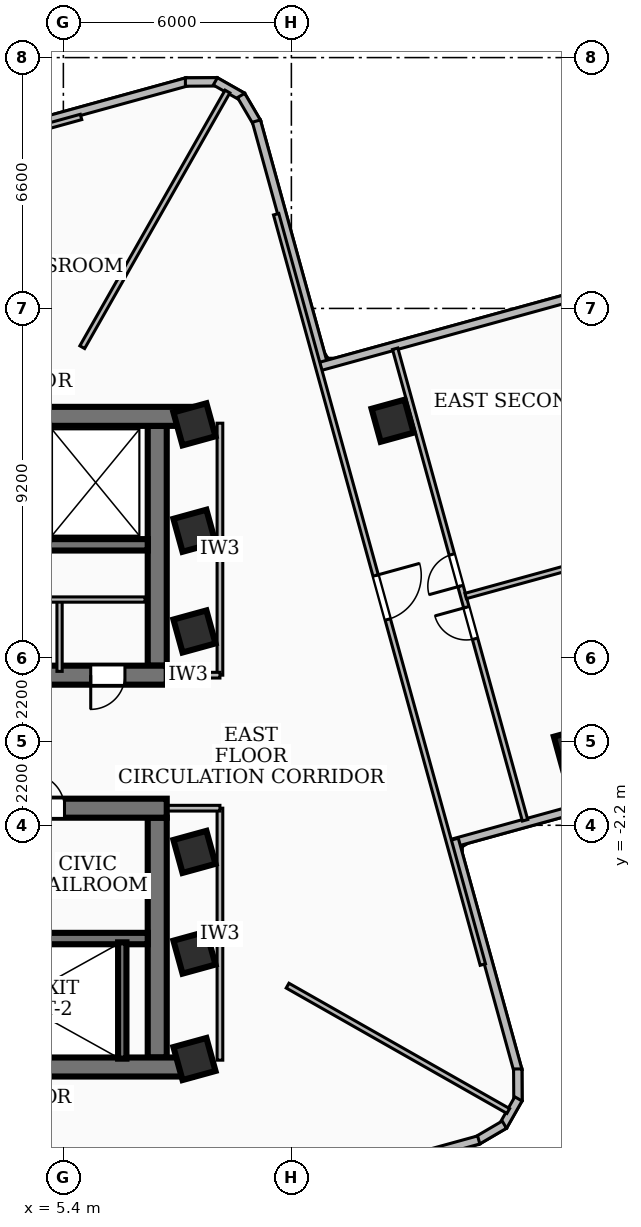
"""IFC4 building model, lengths in metres.
Left out: names, types, materials, properties, quantities, classifications, styles, units other than length and angle.
Written with IfcOpenShell. Run it as: python <this file> out.ifc"""

import sys

from ifc_helpers import new_model, si_unit, direction, frame, frame_2d, origin, origin_2d, place, context, subcontext, project, spatial, rectangle, extrude, element, fill, save


model = new_model("IFC4")
c1 = context("Model", 3, precision=1e-05, world=origin(), true_north=direction((0.0, 1.0)))
c2 = subcontext(c1, "Body", "Model", "MODEL_VIEW")
j1 = project(units=[si_unit("LENGTHUNIT", "METRE"), si_unit("PLANEANGLEUNIT", "RADIAN")], contexts=[c1])
p1 = place(None, origin())
s1 = spatial("IfcSite", under=j1, at=p1, CompositionType="ELEMENT")
p2 = place(p1, origin())
s2 = spatial("IfcBuilding", under=s1, at=p2, CompositionType="ELEMENT")
p3 = place(p2, frame((0.0, 0.0, 134.28)))
s3 = spatial("IfcBuildingStorey", under=s2, at=p3, CompositionType="ELEMENT", Elevation=134.28)
p4 = place(p3, frame((-8.78, 8.56, 0.0), z_axis=(0.0, 0.0, 1.0), x_axis=(1.0, 0.0, 0.0)))
e1 = element("IfcWall", 1, at=p4, inside=s3, PredefinedType="SHEAR", context=c2, shape_type="SweptSolid", body=[
    extrude(rectangle(XDim=17.56, YDim=0.5, at=frame_2d((8.78, 0.0))), origin(), (0.0, 0.0, 1.0), 3.32),
])
p5 = place(p3, frame((8.12, 1.75, 0.0), z_axis=(0.0, 0.0, 1.0), x_axis=(-1.0, 0.0, 0.0)))
e2 = element("IfcWall", 2, at=p5, inside=s3, PredefinedType="SHEAR", context=c2, shape_type="SweptSolid", body=[
    extrude(rectangle(XDim=16.24, YDim=0.5, at=frame_2d((8.12, 0.0))), origin(), (0.0, 0.0, 1.0), 3.32),
])
p6 = place(p5, frame((7.45, 0.0, 0.0)))
e3 = element("IfcOpeningElement", 3, at=p6, cuts=e2, PredefinedType="OPENING", context=c2, shape_type="SweptSolid", body=[
    extrude(rectangle(XDim=1.0, YDim=2.1, at=frame_2d((0.5, 1.05))), frame((0.0, 0.26, 0.0), z_axis=(0.0, -1.0, 0.0), x_axis=(1.0, 0.0, 0.0)), (0.0, 0.0, 1.0), 0.52),
])
p7 = place(p5, frame((3.4, 0.0, 0.0)))
e4 = element("IfcOpeningElement", 4, at=p7, cuts=e2, PredefinedType="OPENING", context=c2, shape_type="SweptSolid", body=[
    extrude(rectangle(XDim=0.9, YDim=2.06, at=frame_2d((0.45, 1.03))), frame((0.0, 0.26, 0.0), z_axis=(0.0, -1.0, 0.0), x_axis=(1.0, 0.0, 0.0)), (0.0, 0.0, 1.0), 0.52),
])
p8 = place(p5, frame((1.1, 0.0, 0.0)))
e5 = element("IfcOpeningElement", 5, at=p8, cuts=e2, PredefinedType="OPENING", context=c2, shape_type="SweptSolid", body=[
    extrude(rectangle(XDim=0.9, YDim=2.06, at=frame_2d((0.45, 1.03))), frame((0.0, 0.26, 0.0), z_axis=(0.0, -1.0, 0.0), x_axis=(1.0, 0.0, 0.0)), (0.0, 0.0, 1.0), 0.52),
])
p9 = place(p3, frame((7.87, 8.31, 0.0), z_axis=(0.0, 0.0, 1.0), x_axis=(0.0, -1.0, 0.0)))
e6 = element("IfcWall", 6, at=p9, inside=s3, PredefinedType="SHEAR", context=c2, shape_type="SweptSolid", body=[
    extrude(rectangle(XDim=6.31, YDim=0.5, at=frame_2d((3.155, 0.0))), origin(), (0.0, 0.0, 1.0), 3.32),
])
p10 = place(p3, frame((7.62, 5.18, 0.0), z_axis=(0.0, 0.0, 1.0), x_axis=(-1.0, 0.0, 0.0)))
e7 = element("IfcWall", 7, at=p10, inside=s3, PredefinedType="SOLIDWALL", context=c2, shape_type="SweptSolid", body=[
    extrude(rectangle(XDim=15.24, YDim=0.3, at=frame_2d((7.62, 0.0))), origin(), (0.0, 0.0, 1.0), 3.32),
])
p11 = place(p10, frame((5.77, 0.0, 0.0)))
e8 = element("IfcOpeningElement", 8, at=p11, cuts=e7, PredefinedType="OPENING", context=c2, shape_type="SweptSolid", body=[
    extrude(rectangle(XDim=1.1, YDim=2.15, at=frame_2d((0.55, 1.075))), frame((0.0, 0.16, 0.0), z_axis=(0.0, -1.0, 0.0), x_axis=(1.0, 0.0, 0.0)), (0.0, 0.0, 1.0), 0.32),
])
p12 = place(p10, frame((2.97, 0.0, 0.0)))
e9 = element("IfcOpeningElement", 9, at=p12, cuts=e7, PredefinedType="OPENING", context=c2, shape_type="SweptSolid", body=[
    extrude(rectangle(XDim=1.1, YDim=2.15, at=frame_2d((0.55, 1.075))), frame((0.0, 0.16, 0.0), z_axis=(0.0, -1.0, 0.0), x_axis=(1.0, 0.0, 0.0)), (0.0, 0.0, 1.0), 0.32),
])
p13 = place(p10, frame((7.97, 0.0, 0.0)))
e10 = element("IfcOpeningElement", 10, at=p13, cuts=e7, PredefinedType="OPENING", context=c2, shape_type="SweptSolid", body=[
    extrude(rectangle(XDim=1.0, YDim=2.1, at=frame_2d((0.5, 1.05))), frame((0.0, 0.16, 0.0), z_axis=(0.0, -1.0, 0.0), x_axis=(1.0, 0.0, 0.0)), (0.0, 0.0, 1.0), 0.32),
])
p14 = place(p3, frame((8.78, -8.56, 0.0), z_axis=(0.0, 0.0, 1.0), x_axis=(-1.0, 0.0, 0.0)))
e11 = element("IfcWall", 11, at=p14, inside=s3, PredefinedType="SHEAR", context=c2, shape_type="SweptSolid", body=[
    extrude(rectangle(XDim=17.56, YDim=0.5, at=frame_2d((8.78, 0.0))), origin(), (0.0, 0.0, 1.0), 3.32),
])
p15 = place(p3, frame((-8.12, -1.75, 0.0), z_axis=(0.0, 0.0, 1.0), x_axis=(1.0, 0.0, 0.0)))
e12 = element("IfcWall", 12, at=p15, inside=s3, PredefinedType="SHEAR", context=c2, shape_type="SweptSolid", body=[
    extrude(rectangle(XDim=16.24, YDim=0.5, at=frame_2d((8.12, 0.0))), origin(), (0.0, 0.0, 1.0), 3.32),
])
p16 = place(p15, frame((7.45, 0.0, 0.0)))
e13 = element("IfcOpeningElement", 13, at=p16, cuts=e12, PredefinedType="OPENING", context=c2, shape_type="SweptSolid", body=[
    extrude(rectangle(XDim=1.0, YDim=2.1, at=frame_2d((0.5, 1.05))), frame((0.0, 0.26, 0.0), z_axis=(0.0, -1.0, 0.0), x_axis=(1.0, 0.0, 0.0)), (0.0, 0.0, 1.0), 0.52),
])
p17 = place(p15, frame((12.65, 0.0, 0.0)))
e14 = element("IfcOpeningElement", 14, at=p17, cuts=e12, PredefinedType="OPENING", context=c2, shape_type="SweptSolid", body=[
    extrude(rectangle(XDim=0.9, YDim=2.06, at=frame_2d((0.45, 1.03))), frame((0.0, 0.26, 0.0), z_axis=(0.0, -1.0, 0.0), x_axis=(1.0, 0.0, 0.0)), (0.0, 0.0, 1.0), 0.52),
])
p18 = place(p15, frame((0.565, 0.0, 0.0)))
e15 = element("IfcOpeningElement", 15, at=p18, cuts=e12, PredefinedType="OPENING", context=c2, shape_type="SweptSolid", body=[
    extrude(rectangle(XDim=1.05, YDim=2.15, at=frame_2d((0.525, 1.075))), frame((0.0, 0.26, 0.0), z_axis=(0.0, -1.0, 0.0), x_axis=(1.0, 0.0, 0.0)), (0.0, 0.0, 1.0), 0.52),
])
p19 = place(p15, frame((2.125, 0.0, 0.0)))
e16 = element("IfcOpeningElement", 16, at=p19, cuts=e12, PredefinedType="OPENING", context=c2, shape_type="SweptSolid", body=[
    extrude(rectangle(XDim=1.05, YDim=2.15, at=frame_2d((0.525, 1.075))), frame((0.0, 0.26, 0.0), z_axis=(0.0, -1.0, 0.0), x_axis=(1.0, 0.0, 0.0)), (0.0, 0.0, 1.0), 0.52),
])
p20 = place(p15, frame((3.685, 0.0, 0.0)))
e17 = element("IfcOpeningElement", 17, at=p20, cuts=e12, PredefinedType="OPENING", context=c2, shape_type="SweptSolid", body=[
    extrude(rectangle(XDim=1.05, YDim=2.15, at=frame_2d((0.525, 1.075))), frame((0.0, 0.26, 0.0), z_axis=(0.0, -1.0, 0.0), x_axis=(1.0, 0.0, 0.0)), (0.0, 0.0, 1.0), 0.52),
])
p21 = place(p3, frame((7.87, -2.0, 0.0), z_axis=(0.0, 0.0, 1.0), x_axis=(0.0, -1.0, 0.0)))
e18 = element("IfcWall", 18, at=p21, inside=s3, PredefinedType="SHEAR", context=c2, shape_type="SweptSolid", body=[
    extrude(rectangle(XDim=6.31, YDim=0.5, at=frame_2d((3.155, 0.0))), origin(), (0.0, 0.0, 1.0), 3.32),
])
p22 = place(p3, frame((-7.62, -5.18, 0.0), z_axis=(0.0, 0.0, 1.0), x_axis=(1.0, 0.0, 0.0)))
e19 = element("IfcWall", 19, at=p22, inside=s3, PredefinedType="SOLIDWALL", context=c2, shape_type="SweptSolid", body=[
    extrude(rectangle(XDim=15.24, YDim=0.3, at=frame_2d((7.62, 0.0))), origin(), (0.0, 0.0, 1.0), 3.32),
])
p23 = place(p22, frame((5.77, 0.0, 0.0)))
e20 = element("IfcOpeningElement", 20, at=p23, cuts=e19, PredefinedType="OPENING", context=c2, shape_type="SweptSolid", body=[
    extrude(rectangle(XDim=1.1, YDim=2.15, at=frame_2d((0.55, 1.075))), frame((0.0, 0.16, 0.0), z_axis=(0.0, -1.0, 0.0), x_axis=(1.0, 0.0, 0.0)), (0.0, 0.0, 1.0), 0.32),
])
p24 = place(p22, frame((7.97, 0.0, 0.0)))
e21 = element("IfcOpeningElement", 21, at=p24, cuts=e19, PredefinedType="OPENING", context=c2, shape_type="SweptSolid", body=[
    extrude(rectangle(XDim=1.0, YDim=2.1, at=frame_2d((0.5, 1.05))), frame((0.0, 0.16, 0.0), z_axis=(0.0, -1.0, 0.0), x_axis=(1.0, 0.0, 0.0)), (0.0, 0.0, 1.0), 0.32),
])
p25 = place(p3, frame((6.95, -8.34, 0.0), z_axis=(0.0, 0.0, 1.0), x_axis=(0.0, 1.0, 0.0)))
e22 = element("IfcWall", 22, at=p25, inside=s3, PredefinedType="SOLIDWALL", context=c2, shape_type="SweptSolid", body=[
    extrude(rectangle(XDim=3.06, YDim=0.22, at=frame_2d((1.53, 0.0))), origin(), (0.0, 0.0, 1.0), 3.32),
])
for number, where, z_axis, x_axis in (
    (23, (8.85, -5.55, 0.0), (0.0, 0.0, 1.0), (0.964, 0.266, 0.0)),
    (24, (8.85, -2.9, 0.0), (0.0, 0.0, 1.0), (0.964, 0.266, 0.0)),
    (25, (8.85, 2.9, 0.0), (0.0, 0.0, 1.0), (0.964, 0.266, 0.0)),
    (26, (8.85, 5.55, 0.0), (0.0, 0.0, 1.0), (0.964, 0.266, 0.0)),
    (27, (8.85, -8.35, 0.0), (0.0, 0.0, 1.0), (0.964, 0.266, 0.0)),
    (28, (8.85, 8.35, 0.0), (0.0, 0.0, 1.0), (0.964, 0.266, 0.0)),
    (29, (18.86, -0.183, 0.0), (0.0, 0.0, 1.0), (0.964, 0.266, 0.0)),
    (30, (14.064, 8.445, 0.0), (0.0, 0.0, 1.0), (0.964, 0.266, 0.0)),
):
    element("IfcColumn", number, at=place(p3, frame(where, z_axis=z_axis, x_axis=x_axis)), inside=s3, PredefinedType="COLUMN", context=c2, shape_type="SweptSolid", body=[
        extrude(rectangle(XDim=0.9, YDim=0.9, at=origin_2d()), origin(), (0.0, 0.0, 1.0), 3.6),
    ])
p26 = place(p3, frame((2.568, 15.686, 0.0), z_axis=(0.0, 0.0, 1.0), x_axis=(0.964094670911, 0.265558779784, 0.0)))
e31 = element("IfcWall", 31, at=p26, inside=s3, PredefinedType="SOLIDWALL", context=c2, shape_type="SweptSolid", body=[
    extrude(rectangle(XDim=6.319, YDim=0.22, at=frame_2d((3.159, 0.0))), origin(), (0.0, 0.0, 1.0), 2.55),
])
p27 = place(p3, frame((8.611, 17.357, 0.0), z_axis=(0.0, 0.0, 1.0), x_axis=(0.999981148579, 0.006140235123, 0.0)))
e32 = element("IfcWall", 32, at=p27, inside=s3, PredefinedType="SOLIDWALL", context=c2, shape_type="SweptSolid", body=[
    extrude(rectangle(XDim=0.835, YDim=0.22, at=frame_2d((0.417, 0.0))), origin(), (0.0, 0.0, 1.0), 3.32),
])
p28 = place(p3, frame((9.399, 17.374, 0.0), z_axis=(0.0, 0.0, 1.0), x_axis=(0.87005199541, -0.492959963164, 0.0)))
e33 = element("IfcWall", 33, at=p28, inside=s3, PredefinedType="SOLIDWALL", context=c2, shape_type="SweptSolid", body=[
    extrude(rectangle(XDim=0.82, YDim=0.22, at=frame_2d((0.41, 0.0))), origin(), (0.0, 0.0, 1.0), 3.32),
])
p29 = place(p3, frame((10.077, 17.004, 0.0), z_axis=(0.0, 0.0, 1.0), x_axis=(0.505779557172, -0.862662761192, 0.0)))
e34 = element("IfcWall", 34, at=p29, inside=s3, PredefinedType="SOLIDWALL", context=c2, shape_type="SweptSolid", body=[
    extrude(rectangle(XDim=0.834, YDim=0.22, at=frame_2d((0.417, 0.0))), origin(), (0.0, 0.0, 1.0), 3.32),
])
p30 = place(p3, frame((10.479, 16.33, 0.0), z_axis=(0.0, 0.0, 1.0), x_axis=(0.265567840793, -0.964092175021, 0.0)))
e35 = element("IfcWall", 35, at=p30, inside=s3, PredefinedType="SOLIDWALL", context=c2, shape_type="SweptSolid", body=[
    extrude(rectangle(XDim=6.759, YDim=0.22, at=frame_2d((3.379, 0.0))), origin(), (0.0, 0.0, 1.0), 3.32),
])
p31 = place(p3, frame((12.166, 9.876, 0.0), z_axis=(0.0, 0.0, 1.0), x_axis=(0.964099811745, 0.2655401156, 0.0)))
e36 = element("IfcWall", 36, at=p31, inside=s3, PredefinedType="SOLIDWALL", context=c2, shape_type="SweptSolid", body=[
    extrude(rectangle(XDim=13.459, YDim=0.22, at=frame_2d((6.729, 0.0))), origin(), (0.0, 0.0, 1.0), 3.32),
])
p32 = place(p31, frame((10.259, 0.0, 0.85)))
e37 = element("IfcOpeningElement", 37, at=p32, cuts=e36, PredefinedType="OPENING", context=c2, shape_type="SweptSolid", body=[
    extrude(rectangle(XDim=2.1, YDim=2.0, at=frame_2d((1.05, 1.0))), frame((0.0, 0.12, 0.0), z_axis=(0.0, -1.0, 0.0), x_axis=(1.0, 0.0, 0.0)), (0.0, 0.0, 1.0), 0.24),
])
p33 = place(p3, frame((28.599, 0.897, 0.0), z_axis=(0.0, 0.0, 1.0), x_axis=(-0.964113270695, -0.265491245185, 0.0)))
e38 = element("IfcWall", 38, at=p33, inside=s3, PredefinedType="SOLIDWALL", context=c2, shape_type="SweptSolid", body=[
    extrude(rectangle(XDim=13.458, YDim=0.22, at=frame_2d((6.729, 0.0))), origin(), (0.0, 0.0, 1.0), 3.32),
])
p34 = place(p33, frame((1.1, 0.0, 0.85)))
e39 = element("IfcOpeningElement", 39, at=p34, cuts=e38, PredefinedType="OPENING", context=c2, shape_type="SweptSolid", body=[
    extrude(rectangle(XDim=2.1, YDim=1.6, at=frame_2d((1.05, 0.8))), frame((0.0, 0.12, 0.0), z_axis=(0.0, -1.0, 0.0), x_axis=(1.0, 0.0, 0.0)), (0.0, 0.0, 1.0), 0.24),
])
p35 = place(p3, frame((15.686, -2.568, 0.0), z_axis=(0.0, 0.0, 1.0), x_axis=(0.265558779784, -0.964094670911, 0.0)))
e40 = element("IfcWall", 40, at=p35, inside=s3, PredefinedType="SOLIDWALL", context=c2, shape_type="SweptSolid", body=[
    extrude(rectangle(XDim=6.319, YDim=0.22, at=frame_2d((3.159, 0.0))), origin(), (0.0, 0.0, 1.0), 3.32),
])
p36 = place(p3, frame((17.357, -8.611, 0.0), z_axis=(0.0, 0.0, 1.0), x_axis=(0.006140235123, -0.999981148579, 0.0)))
e41 = element("IfcWall", 41, at=p36, inside=s3, PredefinedType="SOLIDWALL", context=c2, shape_type="SweptSolid", body=[
    extrude(rectangle(XDim=0.835, YDim=0.22, at=frame_2d((0.417, 0.0))), origin(), (0.0, 0.0, 1.0), 3.32),
])
p37 = place(p3, frame((17.374, -9.399, 0.0), z_axis=(0.0, 0.0, 1.0), x_axis=(-0.492959963164, -0.87005199541, 0.0)))
e42 = element("IfcWall", 42, at=p37, inside=s3, PredefinedType="SOLIDWALL", context=c2, shape_type="SweptSolid", body=[
    extrude(rectangle(XDim=0.82, YDim=0.22, at=frame_2d((0.41, 0.0))), origin(), (0.0, 0.0, 1.0), 3.32),
])
p38 = place(p3, frame((17.004, -10.077, 0.0), z_axis=(0.0, 0.0, 1.0), x_axis=(-0.862662761192, -0.505779557172, 0.0)))
e43 = element("IfcWall", 43, at=p38, inside=s3, PredefinedType="SOLIDWALL", context=c2, shape_type="SweptSolid", body=[
    extrude(rectangle(XDim=0.834, YDim=0.22, at=frame_2d((0.417, 0.0))), origin(), (0.0, 0.0, 1.0), 3.32),
])
p39 = place(p3, frame((16.33, -10.479, 0.0), z_axis=(0.0, 0.0, 1.0), x_axis=(-0.964092175021, -0.265567840793, 0.0)))
e44 = element("IfcWall", 44, at=p39, inside=s3, PredefinedType="SOLIDWALL", context=c2, shape_type="SweptSolid", body=[
    extrude(rectangle(XDim=6.759, YDim=0.22, at=frame_2d((3.379, 0.0))), origin(), (0.0, 0.0, 1.0), 3.32),
])
p40 = place(p3, frame((2.9, 3.74, 0.0), z_axis=(0.0, 0.0, 1.0), x_axis=(1.0, 0.0, 0.0)))
e45 = element("IfcWall", 45, at=p40, inside=s3, PredefinedType="PARTITIONING", context=c2, shape_type="SweptSolid", body=[
    extrude(rectangle(XDim=4.65, YDim=0.138, at=frame_2d((2.325, 0.0))), origin(), (0.0, 0.0, 1.0), 3.32),
])
p41 = place(p3, frame((5.3, 1.85, 0.0), z_axis=(0.0, 0.0, 1.0), x_axis=(0.0, 1.0, 0.0)))
e46 = element("IfcWall", 46, at=p41, inside=s3, PredefinedType="PARTITIONING", context=c2, shape_type="SweptSolid", body=[
    extrude(rectangle(XDim=1.89, YDim=0.138, at=frame_2d((0.945, 0.0))), origin(), (0.0, 0.0, 1.0), 2.55),
])
p42 = place(p3, frame((9.52, 1.75, 0.0), z_axis=(0.0, 0.0, 1.0), x_axis=(0.0, 1.0, 0.0)))
e47 = element("IfcWall", 47, at=p42, inside=s3, PredefinedType="PARTITIONING", context=c2, shape_type="SweptSolid", body=[
    extrude(rectangle(XDim=6.63, YDim=0.15, at=frame_2d((3.315, 0.0))), origin(), (0.0, 0.0, 1.0), 2.55),
])
p43 = place(p3, frame((7.85, 1.75, 0.0), z_axis=(0.0, 0.0, 1.0), x_axis=(1.0, 0.0, 0.0)))
e48 = element("IfcWall", 48, at=p43, inside=s3, PredefinedType="PARTITIONING", context=c2, shape_type="SweptSolid", body=[
    extrude(rectangle(XDim=1.67, YDim=0.15, at=frame_2d((0.835, 0.0))), origin(), (0.0, 0.0, 1.0), 2.55),
])
p44 = place(p3, frame((9.52, -8.38, 0.0), z_axis=(0.0, 0.0, 1.0), x_axis=(0.0, 1.0, 0.0)))
e49 = element("IfcWall", 49, at=p44, inside=s3, PredefinedType="PARTITIONING", context=c2, shape_type="SweptSolid", body=[
    extrude(rectangle(XDim=6.63, YDim=0.15, at=frame_2d((3.315, 0.0))), origin(), (0.0, 0.0, 1.0), 2.55),
])
p45 = place(p3, frame((7.85, -1.75, 0.0), z_axis=(0.0, 0.0, 1.0), x_axis=(1.0, 0.0, 0.0)))
e50 = element("IfcWall", 50, at=p45, inside=s3, PredefinedType="PARTITIONING", context=c2, shape_type="SweptSolid", body=[
    extrude(rectangle(XDim=1.67, YDim=0.15, at=frame_2d((0.835, 0.0))), origin(), (0.0, 0.0, 1.0), 2.55),
])
p46 = place(p3, frame((5.897, 10.38, 0.0), z_axis=(0.0, 0.0, 1.0), x_axis=(0.49389771586, 0.869520009125, 0.0)))
e51 = element("IfcWall", 51, at=p46, inside=s3, PredefinedType="PARTITIONING", context=c2, shape_type="SweptSolid", body=[
    extrude(rectangle(XDim=7.737, YDim=0.145, at=frame_2d((3.868, 0.0))), origin(), (0.0, 0.0, 1.0), 2.55),
])
p47 = place(p3, frame((11.3, -6.419, 0.0), z_axis=(0.0, 0.0, 1.0), x_axis=(0.869475469758, -0.493976120363, 0.0)))
e52 = element("IfcWall", 52, at=p47, inside=s3, PredefinedType="PARTITIONING", context=c2, shape_type="SweptSolid", body=[
    extrude(rectangle(XDim=6.679, YDim=0.145, at=frame_2d((3.339, 0.0))), origin(), (0.0, 0.0, 1.0), 3.32),
])
p48 = place(p3, frame((10.999, 13.879, 0.0), z_axis=(0.0, 0.0, 1.0), x_axis=(0.26558288107, -0.964088031915, 0.0)))
e53 = element("IfcWall", 53, at=p48, inside=s3, PredefinedType="PARTITIONING", context=c2, shape_type="SweptSolid", body=[
    extrude(rectangle(XDim=20.479, YDim=0.145, at=frame_2d((10.24, 0.0))), origin(), (0.0, 0.0, 1.0), 2.55),
])
p49 = place(p48, frame((9.86, 0.0, 0.0)))
e54 = element("IfcOpeningElement", 54, at=p49, cuts=e53, PredefinedType="OPENING", context=c2, shape_type="SweptSolid", body=[
    extrude(rectangle(XDim=1.2, YDim=2.1, at=frame_2d((0.6, 1.05))), frame((0.0, 0.083, 0.0), z_axis=(0.0, -1.0, 0.0), x_axis=(1.0, 0.0, 0.0)), (0.0, 0.0, 1.0), 0.165),
])
p50 = place(p3, frame((15.986, 3.833, 0.0), z_axis=(0.0, 0.0, 1.0), x_axis=(0.964097539176, 0.265548366506, 0.0)))
e55 = element("IfcWall", 55, at=p50, inside=s3, PredefinedType="PARTITIONING", context=c2, shape_type="SweptSolid", body=[
    extrude(rectangle(XDim=12.785, YDim=0.145, at=frame_2d((6.393, 0.0))), origin(), (0.0, 0.0, 1.0), 2.812),
])
p51 = place(p3, frame((17.549, -2.069, 0.0), z_axis=(0.0, 0.0, 1.0), x_axis=(-0.265569130282, 0.964091819819, 0.0)))
e56 = element("IfcWall", 56, at=p51, inside=s3, PredefinedType="PARTITIONING", context=c2, shape_type="SweptSolid", body=[
    extrude(rectangle(XDim=12.87, YDim=0.145, at=frame_2d((6.435, 0.0))), origin(), (0.0, 0.0, 1.0), 2.55),
])
p52 = place(p51, frame((4.955, 0.0, 0.0)))
e57 = element("IfcOpeningElement", 57, at=p52, cuts=e56, PredefinedType="OPENING", context=c2, shape_type="SweptSolid", body=[
    extrude(rectangle(XDim=0.86, YDim=2.04, at=frame_2d((0.43, 1.02))), frame((0.0, 0.083, 0.0), z_axis=(0.0, -1.0, 0.0), x_axis=(1.0, 0.0, 0.0)), (0.0, 0.0, 1.0), 0.165),
])
p53 = place(p51, frame((6.395, 0.0, 0.0)))
e58 = element("IfcOpeningElement", 58, at=p53, cuts=e56, PredefinedType="OPENING", context=c2, shape_type="SweptSolid", body=[
    extrude(rectangle(XDim=0.86, YDim=2.04, at=frame_2d((0.43, 1.02))), frame((0.0, 0.083, 0.0), z_axis=(0.0, -1.0, 0.0), x_axis=(1.0, 0.0, 0.0)), (0.0, 0.0, 1.0), 0.165),
])
p54 = place(p3, frame((-13.879, 10.999, 0.0), z_axis=(0.0, 0.0, 1.0), x_axis=(0.964088031915, 0.26558288107, 0.0)))
e59 = element("IfcWall", 59, at=p54, inside=s3, PredefinedType="PARTITIONING", context=c2, shape_type="SweptSolid", body=[
    extrude(rectangle(XDim=20.479, YDim=0.145, at=frame_2d((10.24, 0.0))), origin(), (0.0, 0.0, 1.0), 2.55),
])
p55 = place(p54, frame((9.86, 0.0, 0.0)))
e60 = element("IfcOpeningElement", 60, at=p55, cuts=e59, PredefinedType="OPENING", context=c2, shape_type="SweptSolid", body=[
    extrude(rectangle(XDim=1.2, YDim=2.1, at=frame_2d((0.6, 1.05))), frame((0.0, 0.083, 0.0), z_axis=(0.0, -1.0, 0.0), x_axis=(1.0, 0.0, 0.0)), (0.0, 0.0, 1.0), 0.165),
])
p56 = place(p17, origin())
e61 = element("IfcDoor", 61, at=p56, inside=s3, OperationType="SINGLE_SWING_LEFT", PredefinedType="DOOR", context=c2, shape_type="SweptSolid", body=[
    extrude(rectangle(XDim=0.9, YDim=2.06, at=frame_2d((0.45, 1.03))), frame((0.0, 0.025, 0.0), z_axis=(0.0, -1.0, 0.0), x_axis=(1.0, 0.0, 0.0)), (0.0, 0.0, 1.0), 0.05),
])
fill(e14, e61)
p57 = place(p8, origin())
e62 = element("IfcDoor", 62, at=p57, inside=s3, OperationType="SINGLE_SWING_RIGHT", PredefinedType="DOOR", context=c2, shape_type="SweptSolid", body=[
    extrude(rectangle(XDim=0.9, YDim=2.06, at=frame_2d((0.45, 1.03))), frame((0.0, 0.025, 0.0), z_axis=(0.0, -1.0, 0.0), x_axis=(1.0, 0.0, 0.0)), (0.0, 0.0, 1.0), 0.05),
])
fill(e5, e62)
p58 = place(p49, origin())
e63 = element("IfcDoor", 63, at=p58, inside=s3, OperationType="SINGLE_SWING_LEFT", PredefinedType="DOOR", context=c2, shape_type="SweptSolid", body=[
    extrude(rectangle(XDim=1.2, YDim=2.1, at=frame_2d((0.6, 1.05))), frame((0.0, 0.025, 0.0), z_axis=(0.0, -1.0, 0.0), x_axis=(1.0, 0.0, 0.0)), (0.0, 0.0, 1.0), 0.05),
])
fill(e54, e63)
p59 = place(p52, origin())
e64 = element("IfcDoor", 64, at=p59, inside=s3, OperationType="SINGLE_SWING_RIGHT", PredefinedType="DOOR", context=c2, shape_type="SweptSolid", body=[
    extrude(rectangle(XDim=0.86, YDim=2.04, at=frame_2d((0.43, 1.02))), frame((0.0, 0.025, 0.0), z_axis=(0.0, -1.0, 0.0), x_axis=(1.0, 0.0, 0.0)), (0.0, 0.0, 1.0), 0.05),
])
fill(e57, e64)
p60 = place(p53, origin())
e65 = element("IfcDoor", 65, at=p60, inside=s3, OperationType="SINGLE_SWING_LEFT", PredefinedType="DOOR", context=c2, shape_type="SweptSolid", body=[
    extrude(rectangle(XDim=0.86, YDim=2.04, at=frame_2d((0.43, 1.02))), frame((0.0, 0.025, 0.0), z_axis=(0.0, -1.0, 0.0), x_axis=(1.0, 0.0, 0.0)), (0.0, 0.0, 1.0), 0.05),
])
fill(e58, e65)
save(model, sys.argv[1])
